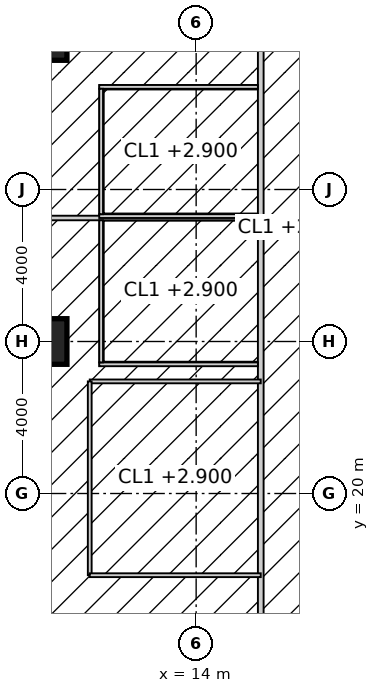
"""IFC4 building model, lengths in metres.
Left out: names, types, materials, properties, quantities, classifications, styles, units other than length and angle.
Written with IfcOpenShell. Run it as: python <this file> out.ifc"""

import sys

from ifc_helpers import new_model, si_unit, direction, frame, frame_2d, origin, origin_2d, place, context, subcontext, project, spatial, rectangle, hollow_rectangle, extrude, element, fill, save


model = new_model("IFC4")
c1 = context("Model", 3, precision=1e-05, world=origin(), true_north=direction((0.0, 1.0)))
c2 = subcontext(c1, "Body", "Model", "MODEL_VIEW")
j1 = project(units=[si_unit("LENGTHUNIT", "METRE"), si_unit("PLANEANGLEUNIT", "RADIAN")], contexts=[c1])
p1 = place(None, origin())
s1 = spatial("IfcSite", under=j1, at=p1, CompositionType="ELEMENT")
p2 = place(p1, origin())
s2 = spatial("IfcBuilding", under=s1, at=p2, CompositionType="ELEMENT")
p3 = place(p2, frame((0.0, 0.0, 19.0)))
s3 = spatial("IfcBuildingStorey", under=s2, at=p3, CompositionType="ELEMENT", Elevation=19.0)
for number, where, z_axis, x_axis in (
    (1, (10.0, 24.0, 0.0), (0.0, 0.0, 1.0), (1.0, 0.0, 0.0)),
    (2, (10.0, 32.0, 0.0), (0.0, 0.0, 1.0), (1.0, 0.0, 0.0)),
):
    element("IfcColumn", number, at=place(p3, frame(where, z_axis=z_axis, x_axis=x_axis)), inside=s3, PredefinedType="COLUMN", context=c2, shape_type="SweptSolid", body=[
        extrude(hollow_rectangle(XDim=1.2, YDim=1.2, WallThickness=0.1, at=origin_2d()), origin(), (0.0, 0.0, 1.0), 4.0),
    ])
p4 = place(p3, frame((15.7, 15.225, 0.0), z_axis=(0.0, 0.0, 1.0), x_axis=(0.0, 1.0, 0.0)))
e3 = element("IfcWall", 3, at=p4, inside=s3, PredefinedType="PARTITIONING", context=c2, shape_type="SweptSolid", body=[
    extrude(rectangle(XDim=23.55, YDim=0.15, at=frame_2d((11.775, 0.0))), origin(), (0.0, 0.0, 1.0), 3.85),
])
p5 = place(p4, frame((5.175, 0.0, 0.0)))
e4 = element("IfcOpeningElement", 4, at=p5, cuts=e3, PredefinedType="OPENING", context=c2, shape_type="SweptSolid", body=[
    extrude(rectangle(XDim=1.8, YDim=2.4, at=frame_2d((0.9, 1.2))), frame((0.0, 0.085, 0.0), z_axis=(0.0, -1.0, 0.0), x_axis=(1.0, 0.0, 0.0)), (0.0, 0.0, 1.0), 0.17),
])
p6 = place(p4, frame((16.825, 0.0, 0.0)))
e5 = element("IfcOpeningElement", 5, at=p6, cuts=e3, PredefinedType="OPENING", context=c2, shape_type="SweptSolid", body=[
    extrude(rectangle(XDim=1.8, YDim=2.4, at=frame_2d((0.9, 1.2))), frame((0.0, 0.085, 0.0), z_axis=(0.0, -1.0, 0.0), x_axis=(1.0, 0.0, 0.0)), (0.0, 0.0, 1.0), 0.17),
])
p7 = place(p3, frame((-1.7, 27.25, 0.0), z_axis=(0.0, 0.0, 1.0), x_axis=(1.0, 0.0, 0.0)))
e6 = element("IfcWall", 6, at=p7, inside=s3, PredefinedType="PARTITIONING", context=c2, shape_type="SweptSolid", body=[
    extrude(rectangle(XDim=17.325, YDim=0.12, at=frame_2d((8.663, 0.0))), origin(), (0.0, 0.0, 1.0), 3.85),
])
for number, where, z_axis, x_axis in (
    (7, (11.45, 23.4, 0.0), (0.0, 0.0, 1.0), (1.0, 0.0, 0.0)),
    (8, (11.45, 27.3, 0.0), (0.0, 0.0, 1.0), (1.0, 0.0, 0.0)),
    (9, (11.45, 30.7, 0.0), (0.0, 0.0, 1.0), (1.0, 0.0, 0.0)),
):
    element("IfcWall", number, at=place(p3, frame(where, z_axis=z_axis, x_axis=x_axis)), inside=s3, PredefinedType="PARTITIONING", context=c2, shape_type="SweptSolid", body=[
        extrude(rectangle(XDim=4.175, YDim=0.1, at=frame_2d((2.087, 0.0))), origin(), (0.0, 0.0, 1.0), 3.85),
    ])
p8 = place(p3, frame((11.5, 23.45, 0.0), z_axis=(0.0, 0.0, 1.0), x_axis=(0.0, 1.0, 0.0)))
e10 = element("IfcWall", 10, at=p8, inside=s3, PredefinedType="PARTITIONING", context=c2, shape_type="SweptSolid", body=[
    extrude(rectangle(XDim=3.739, YDim=0.1, at=frame_2d((1.87, 0.0))), origin(), (0.0, 0.0, 1.0), 3.85),
])
p9 = place(p8, frame((1.375, 0.0, 0.0)))
e11 = element("IfcOpeningElement", 11, at=p9, cuts=e10, PredefinedType="OPENING", context=c2, shape_type="SweptSolid", body=[
    extrude(rectangle(XDim=1.0, YDim=2.2, at=frame_2d((0.5, 1.1))), frame((0.0, 0.06, 0.0), z_axis=(0.0, -1.0, 0.0), x_axis=(1.0, 0.0, 0.0)), (0.0, 0.0, 1.0), 0.12),
])
p10 = place(p3, frame((11.5, 27.35, 0.0), z_axis=(0.0, 0.0, 1.0), x_axis=(0.0, 1.0, 0.0)))
e12 = element("IfcWall", 12, at=p10, inside=s3, PredefinedType="PARTITIONING", context=c2, shape_type="SweptSolid", body=[
    extrude(rectangle(XDim=3.3, YDim=0.1, at=frame_2d((1.65, 0.0))), origin(), (0.0, 0.0, 1.0), 3.85),
])
p11 = place(p10, frame((1.15, 0.0, 0.0)))
e13 = element("IfcOpeningElement", 13, at=p11, cuts=e12, PredefinedType="OPENING", context=c2, shape_type="SweptSolid", body=[
    extrude(rectangle(XDim=1.0, YDim=2.2, at=frame_2d((0.5, 1.1))), frame((0.0, 0.06, 0.0), z_axis=(0.0, -1.0, 0.0), x_axis=(1.0, 0.0, 0.0)), (0.0, 0.0, 1.0), 0.12),
])
p12 = place(p3, frame((15.7, 22.95, 0.0), z_axis=(0.0, 0.0, 1.0), x_axis=(-1.0, 0.0, 0.0)))
e14 = element("IfcWall", 14, at=p12, inside=s3, PredefinedType="PARTITIONING", context=c2, shape_type="SweptSolid", body=[
    extrude(rectangle(XDim=4.5, YDim=0.1, at=frame_2d((2.25, 0.0))), origin(), (0.0, 0.0, 1.0), 3.85),
])
p13 = place(p3, frame((11.2, 22.95, 0.0), z_axis=(0.0, 0.0, 1.0), x_axis=(0.0, -1.0, 0.0)))
e15 = element("IfcWall", 15, at=p13, inside=s3, PredefinedType="PARTITIONING", context=c2, shape_type="SweptSolid", body=[
    extrude(rectangle(XDim=5.1, YDim=0.1, at=frame_2d((2.55, 0.0))), origin(), (0.0, 0.0, 1.0), 3.85),
])
p14 = place(p13, frame((2.05, 0.0, 0.0)))
e16 = element("IfcOpeningElement", 16, at=p14, cuts=e15, PredefinedType="OPENING", context=c2, shape_type="SweptSolid", body=[
    extrude(rectangle(XDim=1.0, YDim=2.2, at=frame_2d((0.5, 1.1))), frame((0.0, 0.06, 0.0), z_axis=(0.0, -1.0, 0.0), x_axis=(1.0, 0.0, 0.0)), (0.0, 0.0, 1.0), 0.12),
])
p15 = place(p3, frame((11.2, 17.85, 0.0), z_axis=(0.0, 0.0, 1.0), x_axis=(1.0, 0.0, 0.0)))
e17 = element("IfcWall", 17, at=p15, inside=s3, PredefinedType="PARTITIONING", context=c2, shape_type="SweptSolid", body=[
    extrude(rectangle(XDim=4.5, YDim=0.1, at=frame_2d((2.25, 0.0))), origin(), (0.0, 0.0, 1.0), 3.85),
])
p16 = place(p5, origin())
e18 = element("IfcDoor", 18, at=p16, inside=s3, OperationType="DOUBLE_DOOR_DOUBLE_SWING", PredefinedType="DOOR", context=c2, shape_type="SweptSolid", body=[
    extrude(rectangle(XDim=1.8, YDim=2.4, at=frame_2d((0.9, 1.2))), frame((0.0, 0.025, 0.0), z_axis=(0.0, -1.0, 0.0), x_axis=(1.0, 0.0, 0.0)), (0.0, 0.0, 1.0), 0.05),
])
fill(e4, e18)
p17 = place(p9, origin())
e19 = element("IfcDoor", 19, at=p17, inside=s3, OperationType="SINGLE_SWING_LEFT", PredefinedType="DOOR", context=c2, shape_type="SweptSolid", body=[
    extrude(rectangle(XDim=1.0, YDim=2.2, at=frame_2d((0.5, 1.1))), frame((0.0, 0.025, 0.0), z_axis=(0.0, -1.0, 0.0), x_axis=(1.0, 0.0, 0.0)), (0.0, 0.0, 1.0), 0.05),
])
fill(e11, e19)
p18 = place(p11, origin())
e20 = element("IfcDoor", 20, at=p18, inside=s3, OperationType="SINGLE_SWING_LEFT", PredefinedType="DOOR", context=c2, shape_type="SweptSolid", body=[
    extrude(rectangle(XDim=1.0, YDim=2.2, at=frame_2d((0.5, 1.1))), frame((0.0, 0.025, 0.0), z_axis=(0.0, -1.0, 0.0), x_axis=(1.0, 0.0, 0.0)), (0.0, 0.0, 1.0), 0.05),
])
fill(e13, e20)
p19 = place(p14, origin())
e21 = element("IfcDoor", 21, at=p19, inside=s3, OperationType="SINGLE_SWING_RIGHT", PredefinedType="DOOR", context=c2, shape_type="SweptSolid", body=[
    extrude(rectangle(XDim=1.0, YDim=2.2, at=frame_2d((0.5, 1.1))), frame((0.0, 0.025, 0.0), z_axis=(0.0, -1.0, 0.0), x_axis=(1.0, 0.0, 0.0)), (0.0, 0.0, 1.0), 0.05),
])
fill(e16, e21)
save(model, sys.argv[1])
